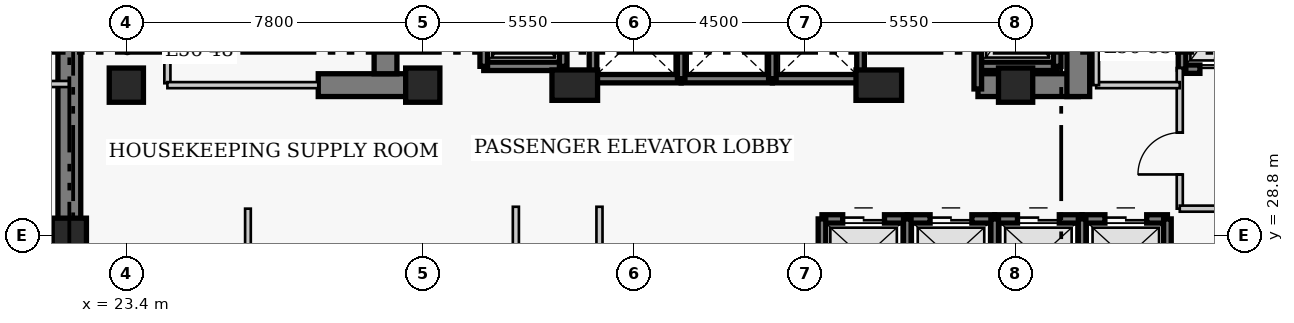
"""IFC4 building model, lengths in metres.
Left out: names, types, materials, properties, quantities, classifications, styles, units other than length and angle.
Written with IfcOpenShell. Run it as: python <this file> out.ifc"""

import sys

from ifc_helpers import new_model, si_unit, direction, frame, frame_2d, origin, origin_2d, place, context, subcontext, project, spatial, rectangle, extrude, element, fill, save


model = new_model("IFC4")
c1 = context("Model", 3, precision=1e-05, world=origin(), true_north=direction((0.0, 1.0)))
c2 = subcontext(c1, "Body", "Model", "MODEL_VIEW")
j1 = project(units=[si_unit("LENGTHUNIT", "METRE"), si_unit("PLANEANGLEUNIT", "RADIAN")], contexts=[c1])
p1 = place(None, origin())
s1 = spatial("IfcSite", under=j1, at=p1, CompositionType="ELEMENT")
p2 = place(p1, origin())
s2 = spatial("IfcBuilding", under=s1, at=p2, CompositionType="ELEMENT")
p3 = place(p2, frame((0.0, 0.0, 224.1)))
s3 = spatial("IfcBuildingStorey", under=s2, at=p3, CompositionType="ELEMENT", Elevation=224.1)
p4 = place(p3, frame((21.9, 27.05, 0.0), z_axis=(0.0, 0.0, 1.0), x_axis=(0.0, 1.0, 0.0)))
e1 = element("IfcWall", 1, at=p4, inside=s3, PredefinedType="SHEAR", context=c2, shape_type="SweptSolid", body=[
    extrude(rectangle(XDim=13.57, YDim=0.6, at=frame_2d((6.785, 0.0))), origin(), (0.0, 0.0, 1.0), 3.9),
])
p5 = place(p3, frame((28.45, 32.75, 0.0), z_axis=(0.0, 0.0, 1.0), x_axis=(1.0, 0.0, 0.0)))
e2 = element("IfcWall", 2, at=p5, inside=s3, PredefinedType="SHEAR", context=c2, shape_type="SweptSolid", body=[
    extrude(rectangle(XDim=2.4, YDim=0.6, at=frame_2d((1.2, 0.0))), origin(), (0.0, 0.0, 1.0), 3.9),
])
p6 = place(p3, frame((45.81, 32.75, 0.0), z_axis=(0.0, 0.0, 1.0), x_axis=(1.0, 0.0, 0.0)))
e3 = element("IfcWall", 3, at=p6, inside=s3, PredefinedType="SHEAR", context=c2, shape_type="SweptSolid", body=[
    extrude(rectangle(XDim=2.64, YDim=0.6, at=frame_2d((1.32, 0.0))), origin(), (0.0, 0.0, 1.0), 3.9),
])
p7 = place(p3, frame((30.22, 33.05, 0.0), z_axis=(0.0, 0.0, 1.0), x_axis=(0.0, 1.0, 0.0)))
e4 = element("IfcWall", 4, at=p7, inside=s3, PredefinedType="SHEAR", context=c2, shape_type="SweptSolid", body=[
    extrude(rectangle(XDim=7.27, YDim=0.6, at=frame_2d((3.635, 0.0))), origin(), (0.0, 0.0, 1.0), 3.9),
])
p8 = place(p3, frame((48.45, 32.45, 0.0), z_axis=(0.0, 0.0, 1.0), x_axis=(0.0, 1.0, 0.0)))
e5 = element("IfcWall", 5, at=p8, inside=s3, PredefinedType="SHEAR", context=c2, shape_type="SweptSolid", body=[
    extrude(rectangle(XDim=7.87, YDim=0.6, at=frame_2d((3.935, 0.0))), origin(), (0.0, 0.0, 1.0), 3.9),
])
p9 = place(p8, frame((5.75, 0.0, 0.0)))
e6 = element("IfcOpeningElement", 6, at=p9, cuts=e5, PredefinedType="OPENING", context=c2, shape_type="SweptSolid", body=[
    extrude(rectangle(XDim=1.1, YDim=2.15, at=frame_2d((0.55, 1.075))), frame((0.0, 0.31, 0.0), z_axis=(0.0, -1.0, 0.0), x_axis=(1.0, 0.0, 0.0)), (0.0, 0.0, 1.0), 0.62),
])
for number, where, z_axis, x_axis in (
    (7, (21.9, 28.8, 0.0), (0.0, 0.0, 1.0), (1.0, 0.0, 0.0)),
    (8, (23.4, 32.75, 0.0), (0.0, 0.0, 1.0), (1.0, 0.0, 0.0)),
    (9, (31.2, 32.75, 0.0), (0.0, 0.0, 1.0), (1.0, 0.0, 0.0)),
):
    element("IfcColumn", number, at=place(p3, frame(where, z_axis=z_axis, x_axis=x_axis)), inside=s3, PredefinedType="COLUMN", context=c2, shape_type="SweptSolid", body=[
        extrude(rectangle(XDim=0.9, YDim=0.9, at=origin_2d()), origin(), (0.0, 0.0, 1.0), 3.9),
    ])
for number, where, z_axis, x_axis in (
    (10, (35.2, 32.75, 0.0), (0.0, 0.0, 1.0), (1.0, 0.0, 0.0)),
    (11, (43.2, 32.75, 0.0), (0.0, 0.0, 1.0), (1.0, 0.0, 0.0)),
):
    element("IfcColumn", number, at=place(p3, frame(where, z_axis=z_axis, x_axis=x_axis)), inside=s3, PredefinedType="COLUMN", context=c2, shape_type="SweptSolid", body=[
        extrude(rectangle(XDim=1.2, YDim=0.8, at=origin_2d()), origin(), (0.0, 0.0, 1.0), 3.9),
    ])
p10 = place(p3, frame((46.8, 32.75, 0.0), z_axis=(0.0, 0.0, 1.0), x_axis=(1.0, 0.0, 0.0)))
e12 = element("IfcColumn", 12, at=p10, inside=s3, PredefinedType="COLUMN", context=c2, shape_type="SweptSolid", body=[
    extrude(rectangle(XDim=0.9, YDim=0.9, at=origin_2d()), origin(), (0.0, 0.0, 1.0), 3.9),
])
p11 = place(p3, frame((41.705, 29.23, 0.0), z_axis=(0.0, 0.0, 1.0), x_axis=(1.0, 0.0, 0.0)))
e13 = element("IfcWall", 13, at=p11, inside=s3, PredefinedType="SHEAR", context=c2, shape_type="SweptSolid", body=[
    extrude(rectangle(XDim=2.245, YDim=0.22, at=frame_2d((1.123, 0.0))), origin(), (0.0, 0.0, 1.0), 3.9),
])
p12 = place(p11, frame((0.545, 0.0, 0.0)))
e14 = element("IfcOpeningElement", 14, at=p12, cuts=e13, PredefinedType="OPENING", context=c2, shape_type="SweptSolid", body=[
    extrude(rectangle(XDim=1.1, YDim=2.15, at=frame_2d((0.55, 1.075))), frame((0.0, 0.12, 0.0), z_axis=(0.0, -1.0, 0.0), x_axis=(1.0, 0.0, 0.0)), (0.0, 0.0, 1.0), 0.24),
])
p13 = place(p3, frame((41.705, 27.17, 0.0), z_axis=(0.0, 0.0, 1.0), x_axis=(0.0, 1.0, 0.0)))
e15 = element("IfcWall", 15, at=p13, inside=s3, PredefinedType="SHEAR", context=c2, shape_type="SweptSolid", body=[
    extrude(rectangle(XDim=2.06, YDim=0.2, at=frame_2d((1.03, 0.0))), origin(), (0.0, 0.0, 1.0), 3.9),
])
p14 = place(p3, frame((43.95, 29.23, 0.0), z_axis=(0.0, 0.0, 1.0), x_axis=(1.0, 0.0, 0.0)))
e16 = element("IfcWall", 16, at=p14, inside=s3, PredefinedType="SHEAR", context=c2, shape_type="SweptSolid", body=[
    extrude(rectangle(XDim=2.3, YDim=0.22, at=frame_2d((1.15, 0.0))), origin(), (0.0, 0.0, 1.0), 3.9),
])
p15 = place(p14, frame((0.6, 0.0, 0.0)))
e17 = element("IfcOpeningElement", 17, at=p15, cuts=e16, PredefinedType="OPENING", context=c2, shape_type="SweptSolid", body=[
    extrude(rectangle(XDim=1.1, YDim=2.15, at=frame_2d((0.55, 1.075))), frame((0.0, 0.12, 0.0), z_axis=(0.0, -1.0, 0.0), x_axis=(1.0, 0.0, 0.0)), (0.0, 0.0, 1.0), 0.24),
])
p16 = place(p3, frame((43.95, 27.17, 0.0), z_axis=(0.0, 0.0, 1.0), x_axis=(0.0, 1.0, 0.0)))
e18 = element("IfcWall", 18, at=p16, inside=s3, PredefinedType="SHEAR", context=c2, shape_type="SweptSolid", body=[
    extrude(rectangle(XDim=2.06, YDim=0.2, at=frame_2d((1.03, 0.0))), origin(), (0.0, 0.0, 1.0), 3.9),
])
p17 = place(p3, frame((46.25, 29.23, 0.0), z_axis=(0.0, 0.0, 1.0), x_axis=(1.0, 0.0, 0.0)))
e19 = element("IfcWall", 19, at=p17, inside=s3, PredefinedType="SHEAR", context=c2, shape_type="SweptSolid", body=[
    extrude(rectangle(XDim=2.3, YDim=0.22, at=frame_2d((1.15, 0.0))), origin(), (0.0, 0.0, 1.0), 3.9),
])
p18 = place(p17, frame((0.6, 0.0, 0.0)))
e20 = element("IfcOpeningElement", 20, at=p18, cuts=e19, PredefinedType="OPENING", context=c2, shape_type="SweptSolid", body=[
    extrude(rectangle(XDim=1.1, YDim=2.15, at=frame_2d((0.55, 1.075))), frame((0.0, 0.12, 0.0), z_axis=(0.0, -1.0, 0.0), x_axis=(1.0, 0.0, 0.0)), (0.0, 0.0, 1.0), 0.24),
])
p19 = place(p3, frame((46.25, 27.17, 0.0), z_axis=(0.0, 0.0, 1.0), x_axis=(0.0, 1.0, 0.0)))
e21 = element("IfcWall", 21, at=p19, inside=s3, PredefinedType="SHEAR", context=c2, shape_type="SweptSolid", body=[
    extrude(rectangle(XDim=2.06, YDim=0.2, at=frame_2d((1.03, 0.0))), origin(), (0.0, 0.0, 1.0), 3.9),
])
p20 = place(p3, frame((48.55, 29.23, 0.0), z_axis=(0.0, 0.0, 1.0), x_axis=(1.0, 0.0, 0.0)))
e22 = element("IfcWall", 22, at=p20, inside=s3, PredefinedType="SHEAR", context=c2, shape_type="SweptSolid", body=[
    extrude(rectangle(XDim=2.245, YDim=0.22, at=frame_2d((1.123, 0.0))), origin(), (0.0, 0.0, 1.0), 3.9),
])
p21 = place(p20, frame((0.6, 0.0, 0.0)))
e23 = element("IfcOpeningElement", 23, at=p21, cuts=e22, PredefinedType="OPENING", context=c2, shape_type="SweptSolid", body=[
    extrude(rectangle(XDim=1.1, YDim=2.15, at=frame_2d((0.55, 1.075))), frame((0.0, 0.12, 0.0), z_axis=(0.0, -1.0, 0.0), x_axis=(1.0, 0.0, 0.0)), (0.0, 0.0, 1.0), 0.24),
])
for number, where, z_axis, x_axis in (
    (24, (48.55, 27.17, 0.0), (0.0, 0.0, 1.0), (0.0, 1.0, 0.0)),
    (25, (50.795, 27.17, 0.0), (0.0, 0.0, 1.0), (0.0, 1.0, 0.0)),
):
    element("IfcWall", number, at=place(p3, frame(where, z_axis=z_axis, x_axis=x_axis)), inside=s3, PredefinedType="SHEAR", context=c2, shape_type="SweptSolid", body=[
        extrude(rectangle(XDim=2.06, YDim=0.2, at=frame_2d((1.03, 0.0))), origin(), (0.0, 0.0, 1.0), 3.9),
    ])
p22 = place(p3, frame((35.68, 32.92, 0.0), z_axis=(0.0, 0.0, 1.0), x_axis=(1.0, 0.0, 0.0)))
e26 = element("IfcWall", 26, at=p22, inside=s3, PredefinedType="SHEAR", context=c2, shape_type="SweptSolid", body=[
    extrude(rectangle(XDim=2.32, YDim=0.22, at=frame_2d((1.16, 0.0))), origin(), (0.0, 0.0, 1.0), 3.9),
])
p23 = place(p3, frame((35.68, 32.92, 0.0), z_axis=(0.0, 0.0, 1.0), x_axis=(0.0, 1.0, 0.0)))
e27 = element("IfcWall", 27, at=p23, inside=s3, PredefinedType="SHEAR", context=c2, shape_type="SweptSolid", body=[
    extrude(rectangle(XDim=2.16, YDim=0.2, at=frame_2d((1.08, 0.0))), origin(), (0.0, 0.0, 1.0), 3.9),
])
p24 = place(p3, frame((38.0, 32.92, 0.0), z_axis=(0.0, 0.0, 1.0), x_axis=(1.0, 0.0, 0.0)))
e28 = element("IfcWall", 28, at=p24, inside=s3, PredefinedType="SHEAR", context=c2, shape_type="SweptSolid", body=[
    extrude(rectangle(XDim=2.4, YDim=0.22, at=frame_2d((1.2, 0.0))), origin(), (0.0, 0.0, 1.0), 3.9),
])
p25 = place(p3, frame((38.0, 32.92, 0.0), z_axis=(0.0, 0.0, 1.0), x_axis=(0.0, 1.0, 0.0)))
e29 = element("IfcWall", 29, at=p25, inside=s3, PredefinedType="SHEAR", context=c2, shape_type="SweptSolid", body=[
    extrude(rectangle(XDim=2.16, YDim=0.2, at=frame_2d((1.08, 0.0))), origin(), (0.0, 0.0, 1.0), 3.9),
])
p26 = place(p3, frame((40.4, 32.92, 0.0), z_axis=(0.0, 0.0, 1.0), x_axis=(1.0, 0.0, 0.0)))
e30 = element("IfcWall", 30, at=p26, inside=s3, PredefinedType="SHEAR", context=c2, shape_type="SweptSolid", body=[
    extrude(rectangle(XDim=2.32, YDim=0.22, at=frame_2d((1.16, 0.0))), origin(), (0.0, 0.0, 1.0), 3.9),
])
for number, where, z_axis, x_axis in (
    (31, (40.4, 32.92, 0.0), (0.0, 0.0, 1.0), (0.0, 1.0, 0.0)),
    (32, (42.72, 32.92, 0.0), (0.0, 0.0, 1.0), (0.0, 1.0, 0.0)),
):
    element("IfcWall", number, at=place(p3, frame(where, z_axis=z_axis, x_axis=x_axis)), inside=s3, PredefinedType="SHEAR", context=c2, shape_type="SweptSolid", body=[
        extrude(rectangle(XDim=2.16, YDim=0.2, at=frame_2d((1.08, 0.0))), origin(), (0.0, 0.0, 1.0), 3.9),
    ])
p27 = place(p3, frame((51.18, 33.17, 0.0), z_axis=(0.0, 0.0, 1.0), x_axis=(1.0, 0.0, 0.0)))
e33 = element("IfcWall", 33, at=p27, inside=s3, PredefinedType="SHEAR", context=c2, shape_type="SweptSolid", body=[
    extrude(rectangle(XDim=2.42, YDim=0.22, at=frame_2d((1.21, 0.0))), origin(), (0.0, 0.0, 1.0), 3.9),
])
p28 = place(p27, frame((0.47, 0.0, 0.0)))
e34 = element("IfcOpeningElement", 34, at=p28, cuts=e33, PredefinedType="OPENING", context=c2, shape_type="SweptSolid", body=[
    extrude(rectangle(XDim=1.3, YDim=2.15, at=frame_2d((0.65, 1.075))), frame((0.0, 0.12, 0.0), z_axis=(0.0, -1.0, 0.0), x_axis=(1.0, 0.0, 0.0)), (0.0, 0.0, 1.0), 0.24),
])
p29 = place(p3, frame((51.18, 33.17, 0.0), z_axis=(0.0, 0.0, 1.0), x_axis=(0.0, 1.0, 0.0)))
e35 = element("IfcWall", 35, at=p29, inside=s3, PredefinedType="SHEAR", context=c2, shape_type="SweptSolid", body=[
    extrude(rectangle(XDim=2.86, YDim=0.2, at=frame_2d((1.43, 0.0))), origin(), (0.0, 0.0, 1.0), 3.9),
])
p30 = place(p3, frame((32.805, 33.245, 0.0), z_axis=(0.0, 0.0, 1.0), x_axis=(1.0, 0.0, 0.0)))
e36 = element("IfcWall", 36, at=p30, inside=s3, PredefinedType="SHEAR", context=c2, shape_type="SweptSolid", body=[
    extrude(rectangle(XDim=2.09, YDim=0.22, at=frame_2d((1.045, 0.0))), origin(), (0.0, 0.0, 1.0), 3.9),
])
for number, where, z_axis, x_axis in (
    (37, (32.805, 33.245, 0.0), (0.0, 0.0, 1.0), (0.0, 1.0, 0.0)),
    (38, (34.895, 33.245, 0.0), (0.0, 0.0, 1.0), (0.0, 1.0, 0.0)),
):
    element("IfcWall", number, at=place(p3, frame(where, z_axis=z_axis, x_axis=x_axis)), inside=s3, PredefinedType="SHEAR", context=c2, shape_type="SweptSolid", body=[
        extrude(rectangle(XDim=2.91, YDim=0.2, at=frame_2d((1.455, 0.0))), origin(), (0.0, 0.0, 1.0), 3.9),
    ])
p31 = place(p3, frame((45.805, 33.245, 0.0), z_axis=(0.0, 0.0, 1.0), x_axis=(1.0, 0.0, 0.0)))
e39 = element("IfcWall", 39, at=p31, inside=s3, PredefinedType="SHEAR", context=c2, shape_type="SweptSolid", body=[
    extrude(rectangle(XDim=2.09, YDim=0.22, at=frame_2d((1.045, 0.0))), origin(), (0.0, 0.0, 1.0), 3.9),
])
p32 = place(p3, frame((45.805, 32.65, 0.0), z_axis=(0.0, 0.0, 1.0), x_axis=(0.0, 1.0, 0.0)))
e40 = element("IfcWall", 40, at=p32, inside=s3, PredefinedType="SHEAR", context=c2, shape_type="SweptSolid", body=[
    extrude(rectangle(XDim=3.505, YDim=0.2, at=frame_2d((1.752, 0.0))), origin(), (0.0, 0.0, 1.0), 3.9),
])
p33 = place(p3, frame((47.895, 33.245, 0.0), z_axis=(0.0, 0.0, 1.0), x_axis=(0.0, 1.0, 0.0)))
e41 = element("IfcWall", 41, at=p33, inside=s3, PredefinedType="SHEAR", context=c2, shape_type="SweptSolid", body=[
    extrude(rectangle(XDim=2.91, YDim=0.2, at=frame_2d((1.455, 0.0))), origin(), (0.0, 0.0, 1.0), 3.9),
])
p34 = place(p3, frame((24.48, 32.8, 0.0), z_axis=(0.0, 0.0, 1.0), x_axis=(0.0, 1.0, 0.0)))
e42 = element("IfcWall", 42, at=p34, inside=s3, PredefinedType="PARTITIONING", context=c2, shape_type="SweptSolid", body=[
    extrude(rectangle(XDim=3.57, YDim=0.16, at=frame_2d((1.785, 0.0))), origin(), (0.0, 0.0, 1.0), 3.65),
])
p35 = place(p34, frame((1.604, 0.0, 0.0)))
e43 = element("IfcOpeningElement", 43, at=p35, cuts=e42, PredefinedType="OPENING", context=c2, shape_type="SweptSolid", body=[
    extrude(rectangle(XDim=0.9, YDim=2.1, at=frame_2d((0.45, 1.05))), frame((0.0, 0.09, 0.0), z_axis=(0.0, -1.0, 0.0), x_axis=(1.0, 0.0, 0.0)), (0.0, 0.0, 1.0), 0.18),
])
p36 = place(p3, frame((51.12, 29.5, 0.0), z_axis=(0.0, 0.0, 1.0), x_axis=(0.0, 1.0, 0.0)))
e44 = element("IfcWall", 44, at=p36, inside=s3, PredefinedType="PARTITIONING", context=c2, shape_type="SweptSolid", body=[
    extrude(rectangle(XDim=3.7, YDim=0.16, at=frame_2d((1.85, 0.0))), origin(), (0.0, 0.0, 1.0), 3.65),
])
p37 = place(p36, frame((0.9, 0.0, 0.0)))
e45 = element("IfcOpeningElement", 45, at=p37, cuts=e44, PredefinedType="OPENING", context=c2, shape_type="SweptSolid", body=[
    extrude(rectangle(XDim=1.1, YDim=2.15, at=frame_2d((0.55, 1.075))), frame((0.0, 0.09, 0.0), z_axis=(0.0, -1.0, 0.0), x_axis=(1.0, 0.0, 0.0)), (0.0, 0.0, 1.0), 0.18),
])
p38 = place(p3, frame((51.12, 29.5, 0.0), z_axis=(0.0, 0.0, 1.0), x_axis=(1.0, 0.0, 0.0)))
e46 = element("IfcWall", 46, at=p38, inside=s3, PredefinedType="PARTITIONING", context=c2, shape_type="SweptSolid", body=[
    extrude(rectangle(XDim=5.63, YDim=0.16, at=frame_2d((2.815, 0.0))), origin(), (0.0, 0.0, 1.0), 3.65),
])
p39 = place(p3, frame((24.48, 32.75, 0.0), z_axis=(0.0, 0.0, 1.0), x_axis=(1.0, 0.0, 0.0)))
e47 = element("IfcWall", 47, at=p39, inside=s3, PredefinedType="PARTITIONING", context=c2, shape_type="SweptSolid", body=[
    extrude(rectangle(XDim=3.97, YDim=0.16, at=frame_2d((1.985, 0.0))), origin(), (0.0, 0.0, 1.0), 3.65),
])
p40 = place(p3, frame((48.92, 32.75, 0.0), z_axis=(0.0, 0.0, 1.0), x_axis=(1.0, 0.0, 0.0)))
e48 = element("IfcWall", 48, at=p40, inside=s3, PredefinedType="PARTITIONING", context=c2, shape_type="SweptSolid", body=[
    extrude(rectangle(XDim=2.2, YDim=0.16, at=frame_2d((1.1, 0.0))), origin(), (0.0, 0.0, 1.0), 3.65),
])
p41 = place(p3, frame((48.92, 32.75, 0.0), z_axis=(0.0, 0.0, 1.0), x_axis=(0.0, 1.0, 0.0)))
e49 = element("IfcWall", 49, at=p41, inside=s3, PredefinedType="PARTITIONING", context=c2, shape_type="SweptSolid", body=[
    extrude(rectangle(XDim=3.62, YDim=0.15, at=frame_2d((1.81, 0.0))), origin(), (0.0, 0.0, 1.0), 3.65),
])
for number, where, z_axis, x_axis in (
    (50, (33.65, 18.86, 0.0), (0.0, 0.0, 1.0), (0.0, 1.0, 0.0)),
    (51, (35.85, 18.86, 0.0), (0.0, 0.0, 1.0), (0.0, 1.0, 0.0)),
):
    element("IfcWall", number, at=place(p3, frame(where, z_axis=z_axis, x_axis=x_axis)), inside=s3, PredefinedType="PARTITIONING", context=c2, shape_type="SweptSolid", body=[
        extrude(rectangle(XDim=10.69, YDim=0.16, at=frame_2d((5.345, 0.0))), origin(), (0.0, 0.0, 1.0), 3.65),
    ])
p42 = place(p3, frame((19.41, 32.78, 0.0), z_axis=(0.0, 0.0, 1.0), x_axis=(1.0, 0.0, 0.0)))
e52 = element("IfcWall", 52, at=p42, inside=s3, PredefinedType="PARTITIONING", context=c2, shape_type="SweptSolid", body=[
    extrude(rectangle(XDim=2.49, YDim=0.16, at=frame_2d((1.245, 0.0))), origin(), (0.0, 0.0, 1.0), 3.65),
])
p43 = place(p3, frame((26.6, 18.86, 0.0), z_axis=(0.0, 0.0, 1.0), x_axis=(0.0, 1.0, 0.0)))
e53 = element("IfcWall", 53, at=p43, inside=s3, PredefinedType="PARTITIONING", context=c2, shape_type="SweptSolid", body=[
    extrude(rectangle(XDim=10.64, YDim=0.15, at=frame_2d((5.32, 0.0))), origin(), (0.0, 0.0, 1.0), 3.65),
])
p44 = place(p12, origin())
e54 = element("IfcDoor", 54, at=p44, inside=s3, OperationType="DOUBLE_DOOR_SLIDING", PredefinedType="DOOR", context=c2, shape_type="SweptSolid", body=[
    extrude(rectangle(XDim=1.1, YDim=2.15, at=frame_2d((0.55, 1.075))), frame((0.0, 0.025, 0.0), z_axis=(0.0, -1.0, 0.0), x_axis=(1.0, 0.0, 0.0)), (0.0, 0.0, 1.0), 0.05),
])
fill(e14, e54)
p45 = place(p15, origin())
e55 = element("IfcDoor", 55, at=p45, inside=s3, OperationType="DOUBLE_DOOR_SLIDING", PredefinedType="DOOR", context=c2, shape_type="SweptSolid", body=[
    extrude(rectangle(XDim=1.1, YDim=2.15, at=frame_2d((0.55, 1.075))), frame((0.0, 0.025, 0.0), z_axis=(0.0, -1.0, 0.0), x_axis=(1.0, 0.0, 0.0)), (0.0, 0.0, 1.0), 0.05),
])
fill(e17, e55)
p46 = place(p18, origin())
e56 = element("IfcDoor", 56, at=p46, inside=s3, OperationType="DOUBLE_DOOR_SLIDING", PredefinedType="DOOR", context=c2, shape_type="SweptSolid", body=[
    extrude(rectangle(XDim=1.1, YDim=2.15, at=frame_2d((0.55, 1.075))), frame((0.0, 0.025, 0.0), z_axis=(0.0, -1.0, 0.0), x_axis=(1.0, 0.0, 0.0)), (0.0, 0.0, 1.0), 0.05),
])
fill(e20, e56)
p47 = place(p21, origin())
e57 = element("IfcDoor", 57, at=p47, inside=s3, OperationType="DOUBLE_DOOR_SLIDING", PredefinedType="DOOR", context=c2, shape_type="SweptSolid", body=[
    extrude(rectangle(XDim=1.1, YDim=2.15, at=frame_2d((0.55, 1.075))), frame((0.0, 0.025, 0.0), z_axis=(0.0, -1.0, 0.0), x_axis=(1.0, 0.0, 0.0)), (0.0, 0.0, 1.0), 0.05),
])
fill(e23, e57)
p48 = place(p28, origin())
e58 = element("IfcDoor", 58, at=p48, inside=s3, OperationType="DOUBLE_DOOR_SLIDING", PredefinedType="DOOR", context=c2, shape_type="SweptSolid", body=[
    extrude(rectangle(XDim=1.3, YDim=2.15, at=frame_2d((0.65, 1.075))), frame((0.0, 0.025, 0.0), z_axis=(0.0, -1.0, 0.0), x_axis=(1.0, 0.0, 0.0)), (0.0, 0.0, 1.0), 0.05),
])
fill(e34, e58)
p49 = place(p37, origin())
e59 = element("IfcDoor", 59, at=p49, inside=s3, OperationType="SINGLE_SWING_LEFT", PredefinedType="DOOR", context=c2, shape_type="SweptSolid", body=[
    extrude(rectangle(XDim=1.1, YDim=2.15, at=frame_2d((0.55, 1.075))), frame((0.0, 0.025, 0.0), z_axis=(0.0, -1.0, 0.0), x_axis=(1.0, 0.0, 0.0)), (0.0, 0.0, 1.0), 0.05),
])
fill(e45, e59)
save(model, sys.argv[1])
